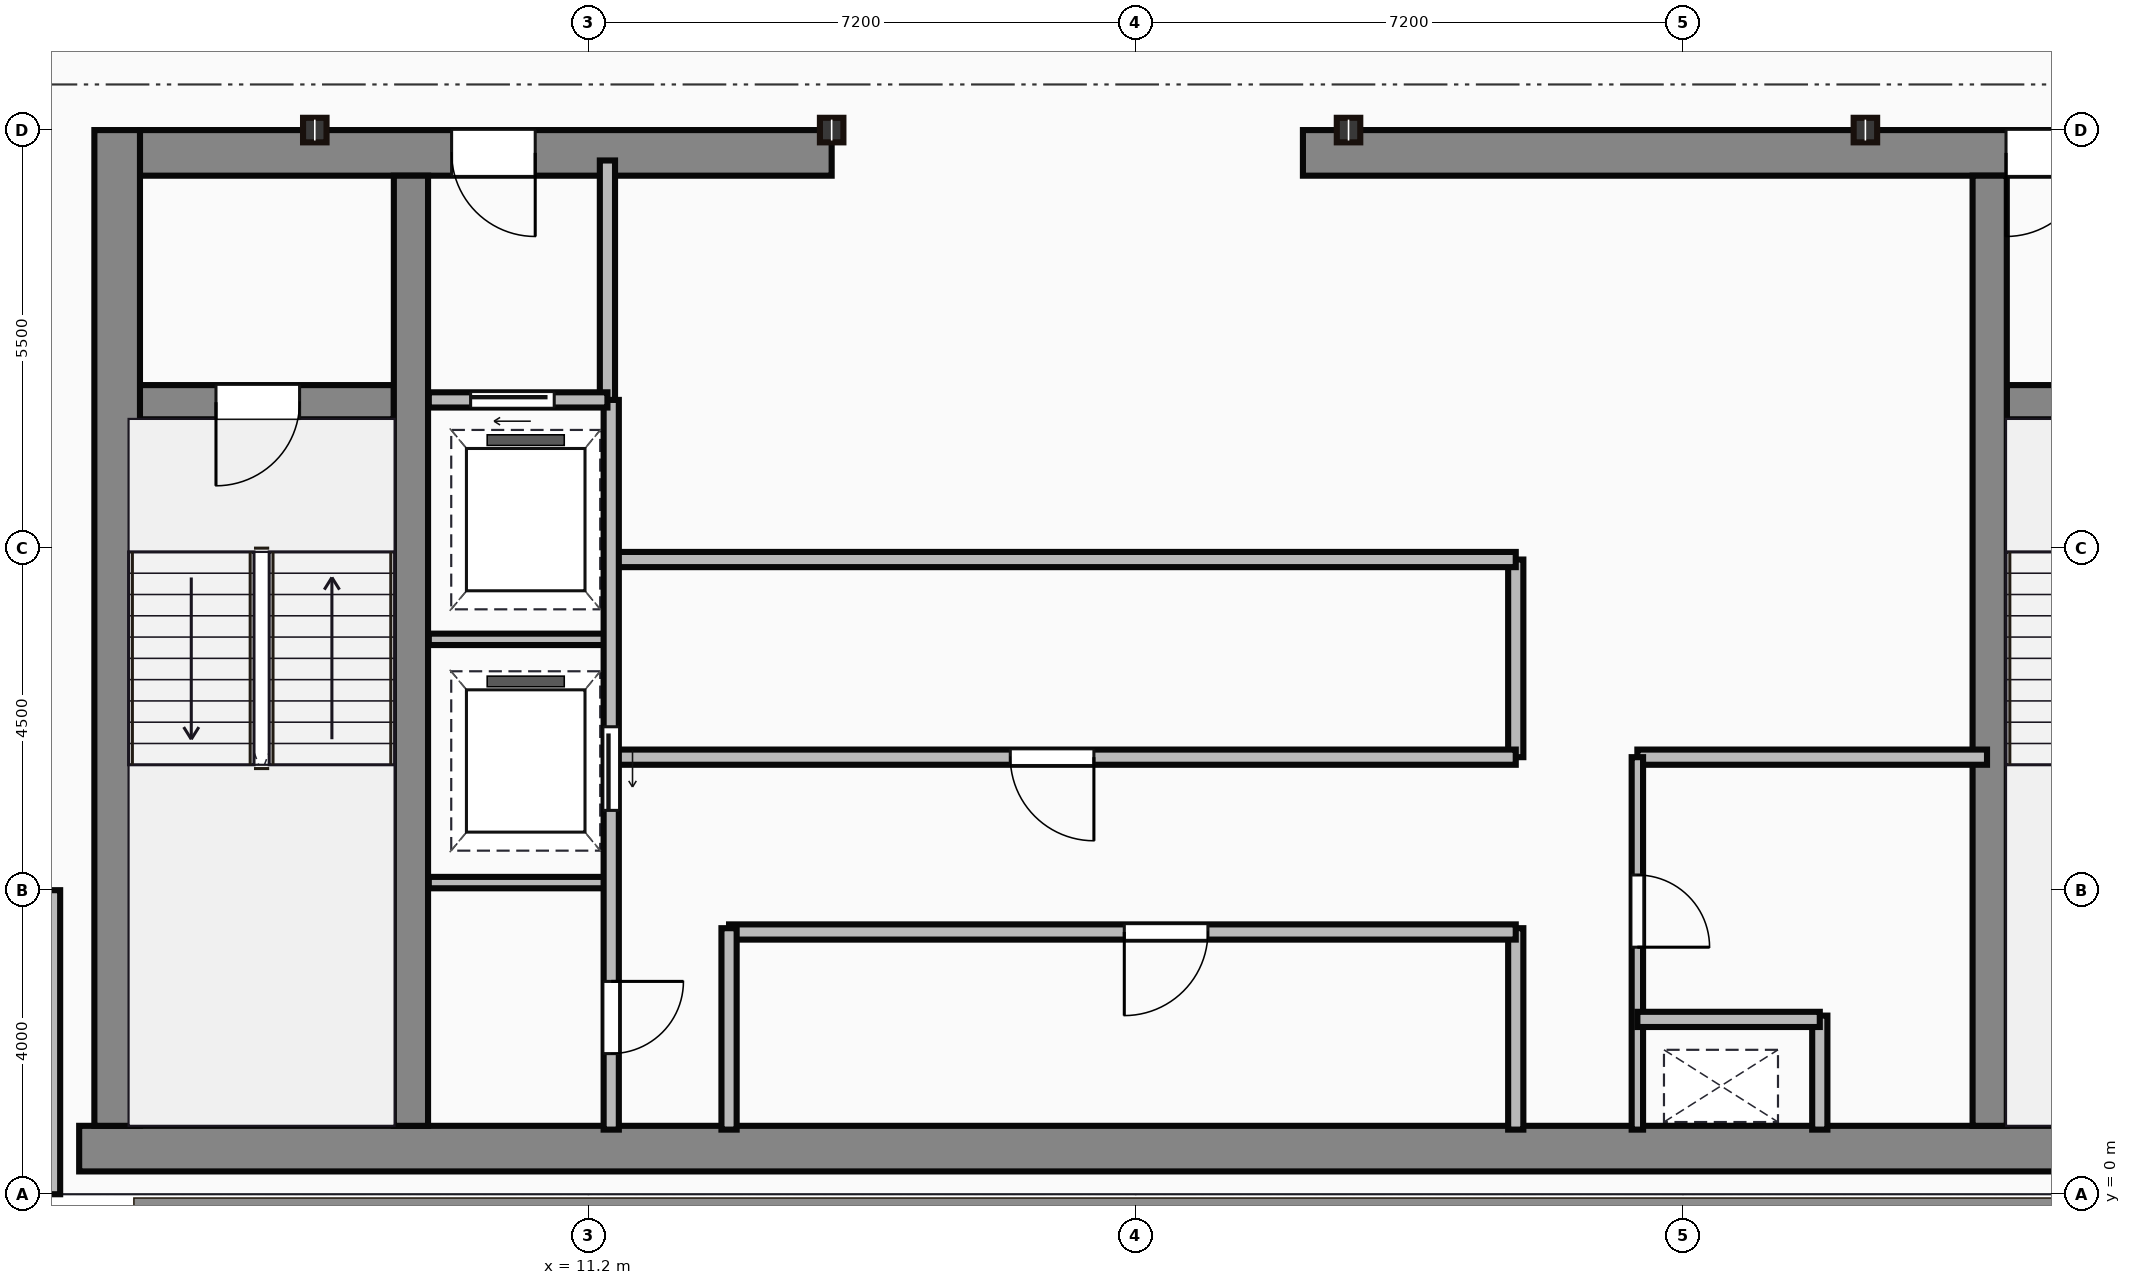
"""IFC4 building model, lengths in metres.
Left out: names, types, materials, properties, quantities, classifications, styles, units other than length and angle.
Written with IfcOpenShell. Run it as: python <this file> out.ifc"""

import sys

from ifc_helpers import new_model, si_unit, direction, frame, frame_2d, origin, origin_2d, place, context, subcontext, project, spatial, rectangle, i_section, extrude, source, transform, mapped, element, fill, save


model = new_model("IFC4")
c1 = context("Model", 3, precision=1e-05, world=origin(), true_north=direction((0.0, 1.0)))
c2 = subcontext(c1, "Body", "Model", "MODEL_VIEW")
j1 = project(units=[si_unit("LENGTHUNIT", "METRE"), si_unit("PLANEANGLEUNIT", "RADIAN")], contexts=[c1])
p1 = place(None, origin())
s1 = spatial("IfcSite", under=j1, at=p1, CompositionType="ELEMENT")
p2 = place(p1, origin())
s2 = spatial("IfcBuilding", under=s1, at=p2, CompositionType="ELEMENT")
p3 = place(p2, frame((0.0, 0.0, 303.65)))
s3 = spatial("IfcBuildingStorey", under=s2, at=p3, CompositionType="ELEMENT", Elevation=303.65)
m1 = source(origin(), c2, "Body", "SweptSolid", [
    extrude(rectangle(XDim=29.5, YDim=0.6, at=frame_2d((14.75, 0.0))), origin(), (0.0, 0.0, 1.0), 3.8),
])
p4 = place(p3, frame((4.5, 0.6, 0.0), z_axis=(0.0, 0.0, 1.0), x_axis=(1.0, 0.0, 0.0)))
e1 = element("IfcWall", 1, at=p4, inside=s3, PredefinedType="SHEAR", context=c2, shape_type="MappedRepresentation", body=[
    mapped(m1, transform((0.0, 0.0, 0.0))),
])
m2 = source(origin(), c2, "Body", "SweptSolid", [
    extrude(rectangle(XDim=13.1, YDim=0.6, at=frame_2d((6.55, 0.0))), origin(), (0.0, 0.0, 1.0), 3.8),
])
p5 = place(p3, frame((5.0, 0.9, 0.0), z_axis=(0.0, 0.0, 1.0), x_axis=(0.0, 1.0, 0.0)))
e2 = element("IfcWall", 2, at=p5, inside=s3, PredefinedType="SHEAR", context=c2, shape_type="MappedRepresentation", body=[
    mapped(m2, transform((0.0, 0.0, 0.0))),
])
m3 = source(origin(), c2, "Body", "SweptSolid", [
    extrude(rectangle(XDim=9.1, YDim=0.6, at=frame_2d((4.55, 0.0))), origin(), (0.0, 0.0, 1.0), 3.8),
])
p6 = place(p3, frame((5.3, 13.7, 0.0), z_axis=(0.0, 0.0, 1.0), x_axis=(1.0, 0.0, 0.0)))
e3 = element("IfcWall", 3, at=p6, inside=s3, PredefinedType="SHEAR", context=c2, shape_type="MappedRepresentation", body=[
    mapped(m3, transform((0.0, 0.0, 0.0))),
])
p7 = place(p6, frame((4.1, 0.0, 0.0)))
e4 = element("IfcOpeningElement", 4, at=p7, cuts=e3, PredefinedType="OPENING", context=c2, shape_type="SweptSolid", body=[
    extrude(rectangle(XDim=1.1, YDim=2.15, at=frame_2d((0.55, 1.075))), frame((0.0, 0.31, 0.0), z_axis=(0.0, -1.0, 0.0), x_axis=(1.0, 0.0, 0.0)), (0.0, 0.0, 1.0), 0.62),
])
m4 = source(origin(), c2, "Body", "SweptSolid", [
    extrude(rectangle(XDim=12.6, YDim=0.6, at=frame_2d((6.3, 0.0))), origin(), (0.0, 0.0, 1.0), 3.8),
])
p8 = place(p3, frame((20.6, 13.7, 0.0), z_axis=(0.0, 0.0, 1.0), x_axis=(1.0, 0.0, 0.0)))
e5 = element("IfcWall", 5, at=p8, inside=s3, PredefinedType="SHEAR", context=c2, shape_type="MappedRepresentation", body=[
    mapped(m4, transform((0.0, 0.0, 0.0))),
])
p9 = place(p8, frame((9.25, 0.0, 0.0)))
e6 = element("IfcOpeningElement", 6, at=p9, cuts=e5, PredefinedType="OPENING", context=c2, shape_type="SweptSolid", body=[
    extrude(rectangle(XDim=1.1, YDim=2.15, at=frame_2d((0.55, 1.075))), frame((0.0, 0.31, 0.0), z_axis=(0.0, -1.0, 0.0), x_axis=(1.0, 0.0, 0.0)), (0.0, 0.0, 1.0), 0.62),
])
m5 = source(origin(), c2, "Body", "SweptSolid", [
    extrude(rectangle(XDim=12.5, YDim=0.45, at=frame_2d((6.25, 0.0))), origin(), (0.0, 0.0, 1.0), 3.8),
])
for number, where, z_axis, x_axis in (
    (7, (8.865, 0.9, 0.0), (0.0, 0.0, 1.0), (0.0, 1.0, 0.0)),
    (8, (29.635, 0.9, 0.0), (0.0, 0.0, 1.0), (0.0, 1.0, 0.0)),
):
    element("IfcWall", number, at=place(p3, frame(where, z_axis=z_axis, x_axis=x_axis)), inside=s3, PredefinedType="SHEAR", context=c2, shape_type="MappedRepresentation", body=[
        mapped(m5, transform((0.0, 0.0, 0.0))),
    ])
m6 = source(origin(), c2, "Body", "SweptSolid", [
    extrude(rectangle(XDim=3.39, YDim=0.45, at=frame_2d((1.695, 0.0))), origin(), (0.0, 0.0, 1.0), 3.8),
])
p10 = place(p3, frame((5.25, 10.42, 0.0), z_axis=(0.0, 0.0, 1.0), x_axis=(1.0, 0.0, 0.0)))
e9 = element("IfcWall", 9, at=p10, inside=s3, PredefinedType="SHEAR", context=c2, shape_type="MappedRepresentation", body=[
    mapped(m6, transform((0.0, 0.0, 0.0))),
])
p11 = place(p10, frame((1.05, 0.0, 0.0)))
e10 = element("IfcOpeningElement", 10, at=p11, cuts=e9, PredefinedType="OPENING", context=c2, shape_type="SweptSolid", body=[
    extrude(rectangle(XDim=1.1, YDim=2.15, at=frame_2d((0.55, 1.075))), frame((0.0, 0.235, 0.0), z_axis=(0.0, -1.0, 0.0), x_axis=(1.0, 0.0, 0.0)), (0.0, 0.0, 1.0), 0.47),
])
p12 = place(p3, frame((29.86, 10.42, 0.0), z_axis=(0.0, 0.0, 1.0), x_axis=(1.0, 0.0, 0.0)))
e11 = element("IfcWall", 11, at=p12, inside=s3, PredefinedType="SHEAR", context=c2, shape_type="MappedRepresentation", body=[
    mapped(m6, transform((0.0, 0.0, 0.0))),
])
p13 = place(p12, frame((1.1, 0.0, 0.0)))
e12 = element("IfcOpeningElement", 12, at=p13, cuts=e11, PredefinedType="OPENING", context=c2, shape_type="SweptSolid", body=[
    extrude(rectangle(XDim=1.1, YDim=2.15, at=frame_2d((0.55, 1.075))), frame((0.0, 0.235, 0.0), z_axis=(0.0, -1.0, 0.0), x_axis=(1.0, 0.0, 0.0)), (0.0, 0.0, 1.0), 0.47),
])
m7 = source(origin(), c2, "Body", "SweptSolid", [
    extrude(i_section(OverallWidth=0.309, OverallDepth=0.323, WebThickness=0.014, FlangeThickness=0.023, at=origin_2d()), origin(), (0.0, 0.0, 1.0), 3.8),
])
for number, where, z_axis, x_axis in (
    (13, (7.6, 14.0, 0.0), (0.0, 0.0, 1.0), (1.0, 0.0, 0.0)),
    (14, (14.4, 14.0, 0.0), (0.0, 0.0, 1.0), (1.0, 0.0, 0.0)),
    (15, (21.2, 14.0, 0.0), (0.0, 0.0, 1.0), (1.0, 0.0, 0.0)),
    (16, (28.0, 14.0, 0.0), (0.0, 0.0, 1.0), (1.0, 0.0, 0.0)),
):
    element("IfcColumn", number, at=place(p3, frame(where, z_axis=z_axis, x_axis=x_axis)), inside=s3, PredefinedType="COLUMN", context=c2, shape_type="MappedRepresentation", body=[
        mapped(m7, transform((0.0, 0.0, 0.0))),
    ])
m8 = source(origin(), c2, "Body", "SweptSolid", [
    extrude(rectangle(XDim=4.0, YDim=0.25, at=frame_2d((2.0, 0.0))), origin(), (0.0, 0.0, 1.0), 3.5),
])
p14 = place(p3, frame((4.125, 4.0, 0.0), z_axis=(0.0, 0.0, 1.0), x_axis=(0.0, -1.0, 0.0)))
e17 = element("IfcWall", 17, at=p14, inside=s3, PredefinedType="STANDARD", context=c2, shape_type="MappedRepresentation", body=[
    mapped(m8, transform((0.0, 0.0, 0.0))),
])
m9 = source(origin(), c2, "Body", "SweptSolid", [
    extrude(rectangle(XDim=3.18, YDim=0.2, at=frame_2d((1.59, 0.0))), origin(), (0.0, 0.0, 1.0), 3.5),
])
p15 = place(p3, frame((11.45, 10.42, 0.0), z_axis=(0.0, 0.0, 1.0), x_axis=(0.0, 1.0, 0.0)))
e18 = element("IfcWall", 18, at=p15, inside=s3, PredefinedType="PARTITIONING", context=c2, shape_type="MappedRepresentation", body=[
    mapped(m9, transform((0.0, 0.0, 0.0))),
])
m10 = source(origin(), c2, "Body", "SweptSolid", [
    extrude(rectangle(XDim=2.35, YDim=0.2, at=frame_2d((1.175, 0.0))), origin(), (0.0, 0.0, 1.0), 3.5),
])
p16 = place(p3, frame((9.1, 10.45, 0.0), z_axis=(0.0, 0.0, 1.0), x_axis=(1.0, 0.0, 0.0)))
e19 = element("IfcWall", 19, at=p16, inside=s3, PredefinedType="PARTITIONING", context=c2, shape_type="MappedRepresentation", body=[
    mapped(m10, transform((0.0, 0.0, 0.0))),
])
p17 = place(p16, frame((0.55, 0.0, 0.0)))
e20 = element("IfcOpeningElement", 20, at=p17, cuts=e19, PredefinedType="OPENING", context=c2, shape_type="SweptSolid", body=[
    extrude(rectangle(XDim=1.1, YDim=2.15, at=frame_2d((0.55, 1.075))), frame((0.0, 0.11, 0.0), z_axis=(0.0, -1.0, 0.0), x_axis=(1.0, 0.0, 0.0)), (0.0, 0.0, 1.0), 0.22),
])
m11 = source(origin(), c2, "Body", "SweptSolid", [
    extrude(rectangle(XDim=9.6, YDim=0.2, at=frame_2d((4.8, 0.0))), origin(), (0.0, 0.0, 1.0), 3.5),
])
p18 = place(p3, frame((11.5, 0.85, 0.0), z_axis=(0.0, 0.0, 1.0), x_axis=(0.0, 1.0, 0.0)))
e21 = element("IfcWall", 21, at=p18, inside=s3, PredefinedType="PARTITIONING", context=c2, shape_type="MappedRepresentation", body=[
    mapped(m11, transform((0.0, 0.0, 0.0))),
])
p19 = place(p18, frame((4.2, 0.0, 0.0)))
e22 = element("IfcOpeningElement", 22, at=p19, cuts=e21, PredefinedType="OPENING", context=c2, shape_type="SweptSolid", body=[
    extrude(rectangle(XDim=1.1, YDim=2.15, at=frame_2d((0.55, 1.075))), frame((0.0, 0.11, 0.0), z_axis=(0.0, -1.0, 0.0), x_axis=(1.0, 0.0, 0.0)), (0.0, 0.0, 1.0), 0.22),
])
p20 = place(p18, frame((1.0, 0.0, 0.0)))
e23 = element("IfcOpeningElement", 23, at=p20, cuts=e21, PredefinedType="OPENING", context=c2, shape_type="SweptSolid", body=[
    extrude(rectangle(XDim=0.95, YDim=2.15, at=frame_2d((0.475, 1.075))), frame((0.0, 0.11, 0.0), z_axis=(0.0, -1.0, 0.0), x_axis=(1.0, 0.0, 0.0)), (0.0, 0.0, 1.0), 0.22),
])
m12 = source(origin(), c2, "Body", "SweptSolid", [
    extrude(rectangle(XDim=2.4, YDim=0.15, at=frame_2d((1.2, 0.0))), origin(), (0.0, 0.0, 1.0), 3.5),
])
for number, where, z_axis, x_axis in (
    (24, (9.1, 4.1, 0.0), (0.0, 0.0, 1.0), (1.0, 0.0, 0.0)),
    (25, (9.1, 7.3, 0.0), (0.0, 0.0, 1.0), (1.0, 0.0, 0.0)),
):
    element("IfcWall", number, at=place(p3, frame(where, z_axis=z_axis, x_axis=x_axis)), inside=s3, PredefinedType="PARTITIONING", context=c2, shape_type="MappedRepresentation", body=[
        mapped(m12, transform((0.0, 0.0, 0.0))),
    ])
m13 = source(origin(), c2, "Body", "SweptSolid", [
    extrude(rectangle(XDim=2.65, YDim=0.2, at=frame_2d((1.325, 0.0))), origin(), (0.0, 0.0, 1.0), 3.5),
])
p21 = place(p3, frame((13.05, 0.85, 0.0), z_axis=(0.0, 0.0, 1.0), x_axis=(0.0, 1.0, 0.0)))
e26 = element("IfcWall", 26, at=p21, inside=s3, PredefinedType="PARTITIONING", context=c2, shape_type="MappedRepresentation", body=[
    mapped(m13, transform((0.0, 0.0, 0.0))),
])
m14 = source(origin(), c2, "Body", "SweptSolid", [
    extrude(rectangle(XDim=10.35, YDim=0.2, at=frame_2d((5.175, 0.0))), origin(), (0.0, 0.0, 1.0), 3.5),
])
p22 = place(p3, frame((13.05, 3.45, 0.0), z_axis=(0.0, 0.0, 1.0), x_axis=(1.0, 0.0, 0.0)))
e27 = element("IfcWall", 27, at=p22, inside=s3, PredefinedType="PARTITIONING", context=c2, shape_type="MappedRepresentation", body=[
    mapped(m14, transform((0.0, 0.0, 0.0))),
])
p23 = place(p22, frame((5.2, 0.0, 0.0)))
e28 = element("IfcOpeningElement", 28, at=p23, cuts=e27, PredefinedType="OPENING", context=c2, shape_type="SweptSolid", body=[
    extrude(rectangle(XDim=1.1, YDim=2.15, at=frame_2d((0.55, 1.075))), frame((0.0, 0.11, 0.0), z_axis=(0.0, -1.0, 0.0), x_axis=(1.0, 0.0, 0.0)), (0.0, 0.0, 1.0), 0.22),
])
p24 = place(p3, frame((23.4, 0.85, 0.0), z_axis=(0.0, 0.0, 1.0), x_axis=(0.0, 1.0, 0.0)))
e29 = element("IfcWall", 29, at=p24, inside=s3, PredefinedType="PARTITIONING", context=c2, shape_type="MappedRepresentation", body=[
    mapped(m13, transform((0.0, 0.0, 0.0))),
])
m15 = source(origin(), c2, "Body", "SweptSolid", [
    extrude(rectangle(XDim=11.85, YDim=0.2, at=frame_2d((5.925, 0.0))), origin(), (0.0, 0.0, 1.0), 3.5),
])
p25 = place(p3, frame((11.55, 5.75, 0.0), z_axis=(0.0, 0.0, 1.0), x_axis=(1.0, 0.0, 0.0)))
e30 = element("IfcWall", 30, at=p25, inside=s3, PredefinedType="PARTITIONING", context=c2, shape_type="MappedRepresentation", body=[
    mapped(m15, transform((0.0, 0.0, 0.0))),
])
p26 = place(p25, frame((5.2, 0.0, 0.0)))
e31 = element("IfcOpeningElement", 31, at=p26, cuts=e30, PredefinedType="OPENING", context=c2, shape_type="SweptSolid", body=[
    extrude(rectangle(XDim=1.1, YDim=2.15, at=frame_2d((0.55, 1.075))), frame((0.0, 0.11, 0.0), z_axis=(0.0, -1.0, 0.0), x_axis=(1.0, 0.0, 0.0)), (0.0, 0.0, 1.0), 0.22),
])
p27 = place(p3, frame((11.55, 8.35, 0.0), z_axis=(0.0, 0.0, 1.0), x_axis=(1.0, 0.0, 0.0)))
e32 = element("IfcWall", 32, at=p27, inside=s3, PredefinedType="PARTITIONING", context=c2, shape_type="MappedRepresentation", body=[
    mapped(m15, transform((0.0, 0.0, 0.0))),
])
m16 = source(origin(), c2, "Body", "SweptSolid", [
    extrude(rectangle(XDim=2.6, YDim=0.2, at=frame_2d((1.3, 0.0))), origin(), (0.0, 0.0, 1.0), 3.5),
])
p28 = place(p3, frame((23.4, 5.75, 0.0), z_axis=(0.0, 0.0, 1.0), x_axis=(0.0, 1.0, 0.0)))
e33 = element("IfcWall", 33, at=p28, inside=s3, PredefinedType="PARTITIONING", context=c2, shape_type="MappedRepresentation", body=[
    mapped(m16, transform((0.0, 0.0, 0.0))),
])
m17 = source(origin(), c2, "Body", "SweptSolid", [
    extrude(rectangle(XDim=4.9, YDim=0.15, at=frame_2d((2.45, 0.0))), origin(), (0.0, 0.0, 1.0), 3.5),
])
p29 = place(p3, frame((25.0, 0.85, 0.0), z_axis=(0.0, 0.0, 1.0), x_axis=(0.0, 1.0, 0.0)))
e34 = element("IfcWall", 34, at=p29, inside=s3, PredefinedType="PARTITIONING", context=c2, shape_type="MappedRepresentation", body=[
    mapped(m17, transform((0.0, 0.0, 0.0))),
])
p30 = place(p29, frame((2.4, 0.0, 0.0)))
e35 = element("IfcOpeningElement", 35, at=p30, cuts=e34, PredefinedType="OPENING", context=c2, shape_type="SweptSolid", body=[
    extrude(rectangle(XDim=0.95, YDim=2.15, at=frame_2d((0.475, 1.075))), frame((0.0, 0.085, 0.0), z_axis=(0.0, -1.0, 0.0), x_axis=(1.0, 0.0, 0.0)), (0.0, 0.0, 1.0), 0.17),
])
m18 = source(origin(), c2, "Body", "SweptSolid", [
    extrude(rectangle(XDim=4.6, YDim=0.2, at=frame_2d((2.3, 0.0))), origin(), (0.0, 0.0, 1.0), 3.5),
])
p31 = place(p3, frame((25.0, 5.75, 0.0), z_axis=(0.0, 0.0, 1.0), x_axis=(1.0, 0.0, 0.0)))
e36 = element("IfcWall", 36, at=p31, inside=s3, PredefinedType="PARTITIONING", context=c2, shape_type="MappedRepresentation", body=[
    mapped(m18, transform((0.0, 0.0, 0.0))),
])
m19 = source(origin(), c2, "Body", "SweptSolid", [
    extrude(rectangle(XDim=2.4, YDim=0.2, at=frame_2d((1.2, 0.0))), origin(), (0.0, 0.0, 1.0), 3.5),
])
p32 = place(p3, frame((25.0, 2.3, 0.0), z_axis=(0.0, 0.0, 1.0), x_axis=(1.0, 0.0, 0.0)))
e37 = element("IfcWall", 37, at=p32, inside=s3, PredefinedType="PARTITIONING", context=c2, shape_type="MappedRepresentation", body=[
    mapped(m19, transform((0.0, 0.0, 0.0))),
])
m20 = source(origin(), c2, "Body", "SweptSolid", [
    extrude(rectangle(XDim=1.5, YDim=0.2, at=frame_2d((0.75, 0.0))), origin(), (0.0, 0.0, 1.0), 3.5),
])
p33 = place(p3, frame((27.4, 0.85, 0.0), z_axis=(0.0, 0.0, 1.0), x_axis=(0.0, 1.0, 0.0)))
e38 = element("IfcWall", 38, at=p33, inside=s3, PredefinedType="PARTITIONING", context=c2, shape_type="MappedRepresentation", body=[
    mapped(m20, transform((0.0, 0.0, 0.0))),
])
m21 = source(origin(), c2, "Body", "SweptSolid", [
    extrude(rectangle(XDim=1.1, YDim=2.15, at=frame_2d((0.55, 1.075))), frame((0.0, 0.025, 0.0), z_axis=(0.0, -1.0, 0.0), x_axis=(1.0, 0.0, 0.0)), (0.0, 0.0, 1.0), 0.05),
])
p34 = place(p11, frame((1.1, 0.0, 0.0), z_axis=(0.0, 0.0, 1.0), x_axis=(-1.0, 0.0, 0.0)))
e39 = element("IfcDoor", 39, at=p34, inside=s3, OperationType="SINGLE_SWING_LEFT", PredefinedType="DOOR", context=c2, shape_type="MappedRepresentation", body=[
    mapped(m21, transform((0.0, 0.0, 0.0))),
])
fill(e10, e39)
p35 = place(p7, origin())
e40 = element("IfcDoor", 40, at=p35, inside=s3, OperationType="SINGLE_SWING_RIGHT", PredefinedType="DOOR", context=c2, shape_type="MappedRepresentation", body=[
    mapped(m21, transform((0.0, 0.0, 0.0))),
])
fill(e4, e40)
p36 = place(p9, origin())
e41 = element("IfcDoor", 41, at=p36, inside=s3, OperationType="SINGLE_SWING_LEFT", PredefinedType="DOOR", context=c2, shape_type="MappedRepresentation", body=[
    mapped(m21, transform((0.0, 0.0, 0.0))),
])
fill(e6, e41)
p37 = place(p17, origin())
e42 = element("IfcDoor", 42, at=p37, inside=s3, OperationType="SLIDING_TO_LEFT", PredefinedType="DOOR", context=c2, shape_type="MappedRepresentation", body=[
    mapped(m21, transform((0.0, 0.0, 0.0))),
])
fill(e20, e42)
p38 = place(p19, frame((1.1, 0.0, 0.0), z_axis=(0.0, 0.0, 1.0), x_axis=(-1.0, 0.0, 0.0)))
e43 = element("IfcDoor", 43, at=p38, inside=s3, OperationType="SLIDING_TO_LEFT", PredefinedType="DOOR", context=c2, shape_type="MappedRepresentation", body=[
    mapped(m21, transform((0.0, 0.0, 0.0))),
])
fill(e22, e43)
m22 = source(origin(), c2, "Body", "SweptSolid", [
    extrude(rectangle(XDim=0.95, YDim=2.15, at=frame_2d((0.475, 1.075))), frame((0.0, 0.025, 0.0), z_axis=(0.0, -1.0, 0.0), x_axis=(1.0, 0.0, 0.0)), (0.0, 0.0, 1.0), 0.05),
])
p39 = place(p20, frame((0.95, 0.0, 0.0), z_axis=(0.0, 0.0, 1.0), x_axis=(-1.0, 0.0, 0.0)))
e44 = element("IfcDoor", 44, at=p39, inside=s3, OperationType="SINGLE_SWING_RIGHT", PredefinedType="DOOR", context=c2, shape_type="MappedRepresentation", body=[
    mapped(m22, transform((0.0, 0.0, 0.0))),
])
fill(e23, e44)
p40 = place(p23, origin())
e45 = element("IfcDoor", 45, at=p40, inside=s3, OperationType="SINGLE_SWING_LEFT", PredefinedType="DOOR", context=c2, shape_type="MappedRepresentation", body=[
    mapped(m21, transform((0.0, 0.0, 0.0))),
])
fill(e28, e45)
p41 = place(p26, frame((1.1, 0.0, 0.0), z_axis=(0.0, 0.0, 1.0), x_axis=(-1.0, 0.0, 0.0)))
e46 = element("IfcDoor", 46, at=p41, inside=s3, OperationType="SINGLE_SWING_RIGHT", PredefinedType="DOOR", context=c2, shape_type="MappedRepresentation", body=[
    mapped(m21, transform((0.0, 0.0, 0.0))),
])
fill(e31, e46)
p42 = place(p30, origin())
e47 = element("IfcDoor", 47, at=p42, inside=s3, OperationType="SINGLE_SWING_LEFT", PredefinedType="DOOR", context=c2, shape_type="MappedRepresentation", body=[
    mapped(m22, transform((0.0, 0.0, 0.0))),
])
fill(e35, e47)
save(model, sys.argv[1])
